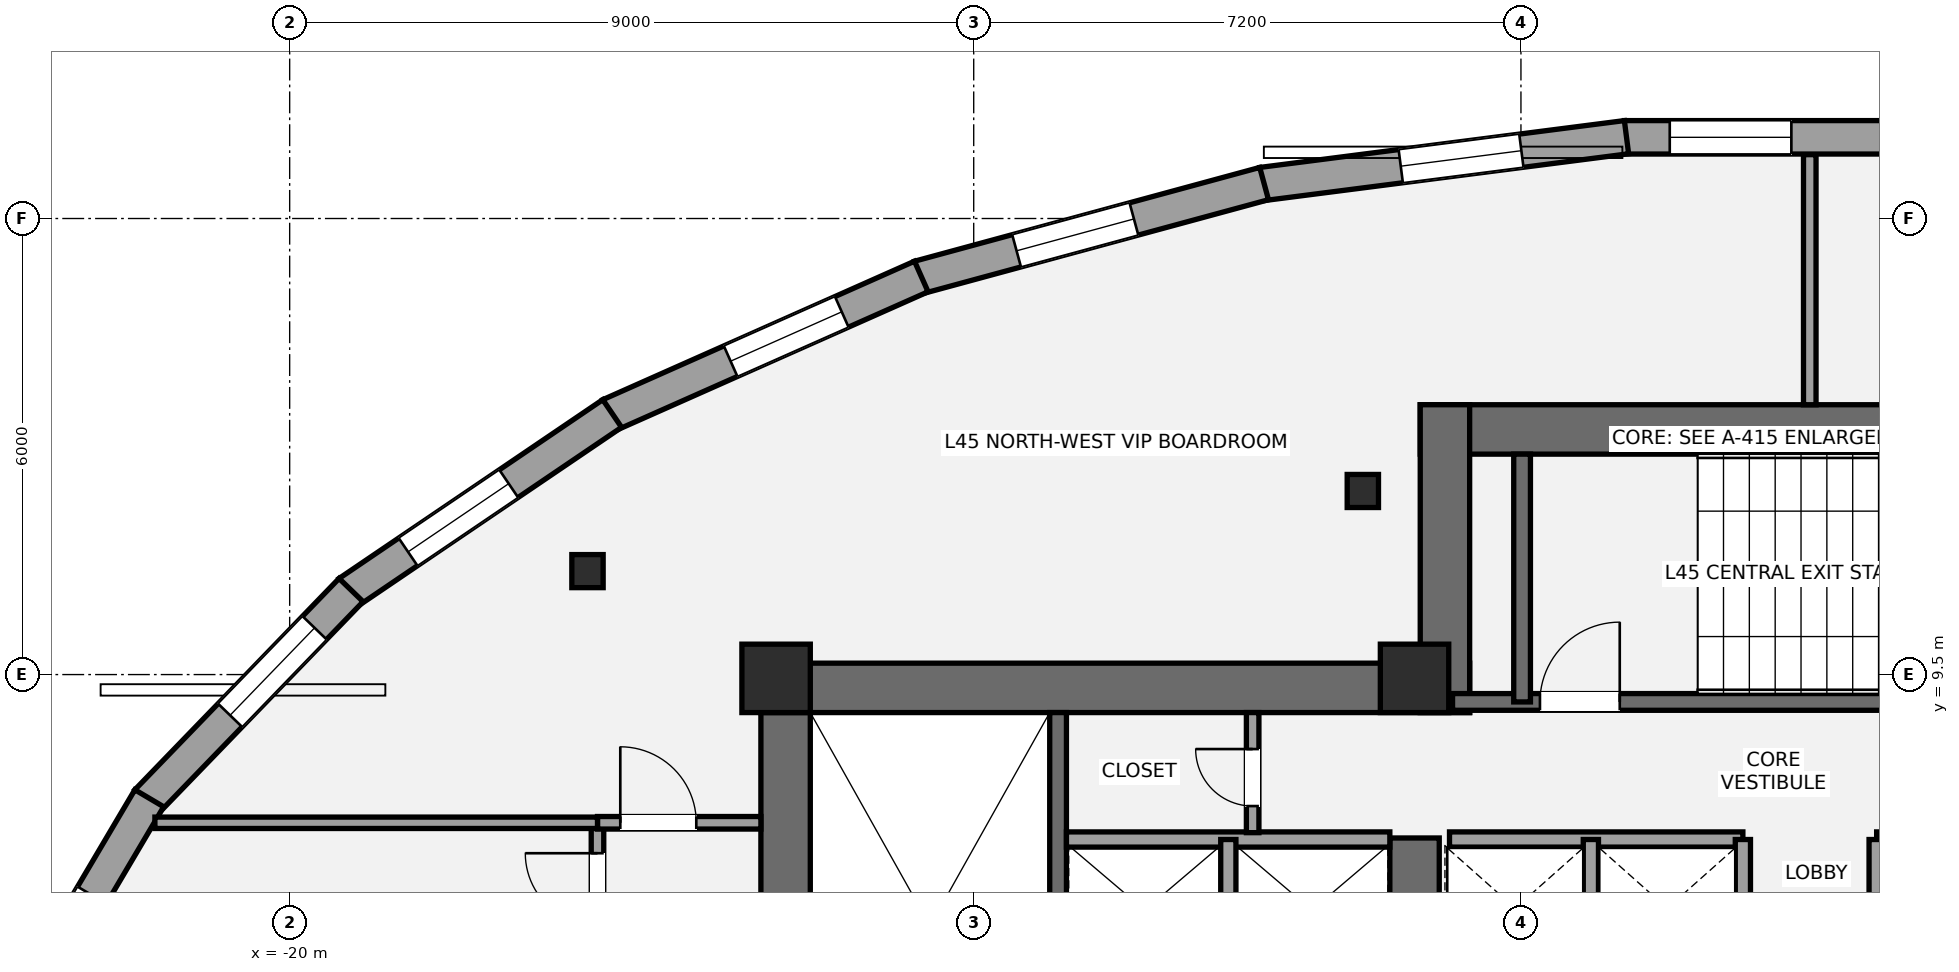
"""IFC4 building model, lengths in metres.
Left out: names, types, materials, properties, quantities, classifications, styles, units other than length and angle.
Written with IfcOpenShell. Run it as: python <this file> out.ifc"""

import sys

from ifc_helpers import new_model, si_unit, direction, frame, frame_2d, origin, origin_2d, place, context, subcontext, project, spatial, rectangle, i_section, extrude, element, fill, save


model = new_model("IFC4")
c1 = context("Model", 3, precision=1e-05, world=origin(), true_north=direction((0.0, 1.0)))
c2 = subcontext(c1, "Body", "Model", "MODEL_VIEW")
j1 = project(units=[si_unit("LENGTHUNIT", "METRE"), si_unit("PLANEANGLEUNIT", "RADIAN")], contexts=[c1])
p1 = place(None, origin())
s1 = spatial("IfcSite", under=j1, at=p1, CompositionType="ELEMENT")
p2 = place(p1, origin())
s2 = spatial("IfcBuilding", under=s1, at=p2, CompositionType="ELEMENT")
p3 = place(p2, frame((0.0, 0.0, 166.2)))
s3 = spatial("IfcBuildingStorey", under=s2, at=p3, CompositionType="ELEMENT", Elevation=166.2)
p4 = place(p3, frame((-13.475, 1.2, 0.0), z_axis=(0.0, 0.0, 1.0), x_axis=(0.0, 1.0, 0.0)))
e1 = element("IfcWall", 1, at=p4, inside=s3, PredefinedType="SHEAR", context=c2, shape_type="SweptSolid", body=[
    extrude(rectangle(XDim=8.45, YDim=0.65, at=frame_2d((4.225, 0.0))), origin(), (0.0, 0.0, 1.0), 3.2),
])
p5 = place(p3, frame((-13.8, 9.325, 0.0), z_axis=(0.0, 0.0, 1.0), x_axis=(1.0, 0.0, 0.0)))
e2 = element("IfcWall", 2, at=p5, inside=s3, PredefinedType="SHEAR", context=c2, shape_type="SweptSolid", body=[
    extrude(rectangle(XDim=9.325, YDim=0.65, at=frame_2d((4.663, 0.0))), origin(), (0.0, 0.0, 1.0), 3.2),
])
p6 = place(p3, frame((-5.2, 5.35, 0.0), z_axis=(0.0, 0.0, 1.0), x_axis=(0.0, 1.0, 0.0)))
e3 = element("IfcWall", 3, at=p6, inside=s3, PredefinedType="SHEAR", context=c2, shape_type="SweptSolid", body=[
    extrude(rectangle(XDim=2.0, YDim=0.65, at=frame_2d((1.0, 0.0))), origin(), (0.0, 0.0, 1.0), 3.2),
])
p7 = place(p3, frame((-9.89, 1.85, 0.0), z_axis=(0.0, 0.0, 1.0), x_axis=(0.0, 1.0, 0.0)))
e4 = element("IfcWall", 4, at=p7, inside=s3, PredefinedType="SHEAR", context=c2, shape_type="SweptSolid", body=[
    extrude(rectangle(XDim=7.15, YDim=0.22, at=frame_2d((3.575, 0.0))), origin(), (0.0, 0.0, 1.0), 3.2),
])
p8 = place(p3, frame((-5.125, 12.725, 0.0), z_axis=(0.0, 0.0, 1.0), x_axis=(1.0, 0.0, 0.0)))
e5 = element("IfcWall", 5, at=p8, inside=s3, PredefinedType="SHEAR", context=c2, shape_type="SweptSolid", body=[
    extrude(rectangle(XDim=10.25, YDim=0.65, at=frame_2d((5.125, 0.0))), origin(), (0.0, 0.0, 1.0), 3.2),
])
p9 = place(p3, frame((-4.8, 9.0, 0.0), z_axis=(0.0, 0.0, 1.0), x_axis=(0.0, 1.0, 0.0)))
e6 = element("IfcWall", 6, at=p9, inside=s3, PredefinedType="SHEAR", context=c2, shape_type="SweptSolid", body=[
    extrude(rectangle(XDim=4.05, YDim=0.65, at=frame_2d((2.025, 0.0))), origin(), (0.0, 0.0, 1.0), 3.2),
])
p10 = place(p3, frame((-4.7, 9.14, 0.0), z_axis=(0.0, 0.0, 1.0), x_axis=(1.0, 0.0, 0.0)))
e7 = element("IfcWall", 7, at=p10, inside=s3, PredefinedType="SHEAR", context=c2, shape_type="SweptSolid", body=[
    extrude(rectangle(XDim=9.3, YDim=0.22, at=frame_2d((4.65, 0.0))), origin(), (0.0, 0.0, 1.0), 3.2),
])
p11 = place(p10, frame((1.15, 0.0, 0.0)))
e8 = element("IfcOpeningElement", 8, at=p11, cuts=e7, PredefinedType="OPENING", context=c2, shape_type="SweptSolid", body=[
    extrude(rectangle(XDim=1.05, YDim=2.15, at=frame_2d((0.525, 1.075))), frame((0.0, 0.12, 0.0), z_axis=(0.0, -1.0, 0.0), x_axis=(1.0, 0.0, 0.0)), (0.0, 0.0, 1.0), 0.24),
])
p12 = place(p3, frame((-3.785, 9.14, 0.0), z_axis=(0.0, 0.0, 1.0), x_axis=(0.0, 1.0, 0.0)))
e9 = element("IfcWall", 9, at=p12, inside=s3, PredefinedType="SHEAR", context=c2, shape_type="SweptSolid", body=[
    extrude(rectangle(XDim=3.26, YDim=0.22, at=frame_2d((1.63, 0.0))), origin(), (0.0, 0.0, 1.0), 3.2),
])
for number, where, z_axis, x_axis in (
    (10, (-13.6, 9.45, 0.0), (0.0, 0.0, 1.0), (1.0, 0.0, 0.0)),
    (11, (-5.2, 9.45, 0.0), (0.0, 0.0, 1.0), (1.0, 0.0, 0.0)),
):
    element("IfcColumn", number, at=place(p3, frame(where, z_axis=z_axis, x_axis=x_axis)), inside=s3, PredefinedType="COLUMN", context=c2, shape_type="SweptSolid", body=[
        extrude(rectangle(XDim=0.9, YDim=0.9, at=origin_2d()), origin(), (0.0, 0.0, 1.0), 3.2),
    ])
for number, where, z_axis, x_axis in (
    (12, (-5.88, 11.915, 0.0), (0.0, 0.0, 1.0), (1.0, 0.0, 0.0)),
    (13, (-16.082, 10.861, 0.0), (0.0, 0.0, 1.0), (1.0, 0.0, 0.0)),
):
    element("IfcColumn", number, at=place(p3, frame(where, z_axis=z_axis, x_axis=x_axis)), inside=s3, PredefinedType="COLUMN", context=c2, shape_type="SweptSolid", body=[
        extrude(i_section(OverallWidth=0.412, OverallDepth=0.435, WebThickness=0.036, FlangeThickness=0.057, at=origin_2d()), origin(), (0.0, 0.0, 1.0), 3.2),
    ])
p13 = place(p3, frame((-2.439, 16.568, 0.0), z_axis=(0.0, 0.0, 1.0), x_axis=(1.0, 0.0, 0.0)))
e14 = element("IfcWall", 14, at=p13, inside=s3, PredefinedType="STANDARD", context=c2, shape_type="SweptSolid", body=[
    extrude(rectangle(XDim=4.878, YDim=0.44, at=frame_2d((2.439, 0.0))), origin(), (0.0, 0.0, 1.0), 2.315),
])
p14 = place(p13, frame((0.597, 0.0, 0.58)))
e15 = element("IfcOpeningElement", 15, at=p14, cuts=e14, PredefinedType="OPENING", context=c2, shape_type="SweptSolid", body=[
    extrude(rectangle(XDim=1.6, YDim=1.55, at=frame_2d((0.8, 0.775))), frame((0.0, 0.23, 0.0), z_axis=(0.0, -1.0, 0.0), x_axis=(1.0, 0.0, 0.0)), (0.0, 0.0, 1.0), 0.46),
])
p15 = place(p3, frame((-7.209, 15.954, 0.0), z_axis=(0.0, 0.0, 1.0), x_axis=(0.991852910824, 0.127388395426, 0.0)))
e16 = element("IfcWall", 16, at=p15, inside=s3, PredefinedType="STANDARD", context=c2, shape_type="SweptSolid", body=[
    extrude(rectangle(XDim=4.837, YDim=0.44, at=frame_2d((2.418, 0.0))), origin(), (0.0, 0.0, 1.0), 2.315),
])
p16 = place(p15, frame((1.843, 0.0, 0.58)))
e17 = element("IfcOpeningElement", 17, at=p16, cuts=e16, PredefinedType="OPENING", context=c2, shape_type="SweptSolid", body=[
    extrude(rectangle(XDim=1.6, YDim=1.55, at=frame_2d((0.8, 0.775))), frame((0.0, 0.23, 0.0), z_axis=(0.0, -1.0, 0.0), x_axis=(1.0, 0.0, 0.0)), (0.0, 0.0, 1.0), 0.46),
])
p17 = place(p3, frame((-11.721, 14.726, 0.0), z_axis=(0.0, 0.0, 1.0), x_axis=(0.965037424263, 0.262112132058, 0.0)))
e18 = element("IfcWall", 18, at=p17, inside=s3, PredefinedType="STANDARD", context=c2, shape_type="SweptSolid", body=[
    extrude(rectangle(XDim=4.707, YDim=0.44, at=frame_2d((2.353, 0.0))), origin(), (0.0, 0.0, 1.0), 2.315),
])
p18 = place(p17, frame((1.332, 0.0, 0.58)))
e19 = element("IfcOpeningElement", 19, at=p18, cuts=e18, PredefinedType="OPENING", context=c2, shape_type="SweptSolid", body=[
    extrude(rectangle(XDim=1.6, YDim=1.55, at=frame_2d((0.8, 0.775))), frame((0.0, 0.23, 0.0), z_axis=(0.0, -1.0, 0.0), x_axis=(1.0, 0.0, 0.0)), (0.0, 0.0, 1.0), 0.46),
])
p19 = place(p3, frame((-15.791, 12.916, 0.0), z_axis=(0.0, 0.0, 1.0), x_axis=(0.913907994914, 0.405921392431, 0.0)))
e20 = element("IfcWall", 20, at=p19, inside=s3, PredefinedType="STANDARD", context=c2, shape_type="SweptSolid", body=[
    extrude(rectangle(XDim=4.487, YDim=0.44, at=frame_2d((2.244, 0.0))), origin(), (0.0, 0.0, 1.0), 2.315),
])
p20 = place(p19, frame((1.742, 0.0, 0.58)))
e21 = element("IfcOpeningElement", 21, at=p20, cuts=e20, PredefinedType="OPENING", context=c2, shape_type="SweptSolid", body=[
    extrude(rectangle(XDim=1.6, YDim=1.55, at=frame_2d((0.8, 0.775))), frame((0.0, 0.23, 0.0), z_axis=(0.0, -1.0, 0.0), x_axis=(1.0, 0.0, 0.0)), (0.0, 0.0, 1.0), 0.46),
])
p21 = place(p3, frame((-19.227, 10.583, 0.0), z_axis=(0.0, 0.0, 1.0), x_axis=(0.827760762475, 0.561081206338, 0.0)))
e22 = element("IfcWall", 22, at=p21, inside=s3, PredefinedType="STANDARD", context=c2, shape_type="SweptSolid", body=[
    extrude(rectangle(XDim=4.192, YDim=0.44, at=frame_2d((2.096, 0.0))), origin(), (0.0, 0.0, 1.0), 2.315),
])
p22 = place(p21, frame((0.947, 0.0, 0.58)))
e23 = element("IfcOpeningElement", 23, at=p22, cuts=e22, PredefinedType="OPENING", context=c2, shape_type="SweptSolid", body=[
    extrude(rectangle(XDim=1.6, YDim=1.55, at=frame_2d((0.8, 0.775))), frame((0.0, 0.23, 0.0), z_axis=(0.0, -1.0, 0.0), x_axis=(1.0, 0.0, 0.0)), (0.0, 0.0, 1.0), 0.46),
])
p23 = place(p3, frame((-21.879, 7.832, 0.0), z_axis=(0.0, 0.0, 1.0), x_axis=(0.694975307772, 0.719033602544, 0.0)))
e24 = element("IfcWall", 24, at=p23, inside=s3, PredefinedType="STANDARD", context=c2, shape_type="SweptSolid", body=[
    extrude(rectangle(XDim=3.866, YDim=0.44, at=frame_2d((1.933, 0.0))), origin(), (0.0, 0.0, 1.0), 2.315),
])
p24 = place(p23, frame((1.575, 0.0, 0.58)))
e25 = element("IfcOpeningElement", 25, at=p24, cuts=e24, PredefinedType="OPENING", context=c2, shape_type="SweptSolid", body=[
    extrude(rectangle(XDim=1.6, YDim=1.55, at=frame_2d((0.8, 0.775))), frame((0.0, 0.23, 0.0), z_axis=(0.0, -1.0, 0.0), x_axis=(1.0, 0.0, 0.0)), (0.0, 0.0, 1.0), 0.46),
])
p25 = place(p3, frame((-23.667, 4.794, 0.0), z_axis=(0.0, 0.0, 1.0), x_axis=(0.508883387051, 0.860835465338, 0.0)))
e26 = element("IfcWall", 26, at=p25, inside=s3, PredefinedType="STANDARD", context=c2, shape_type="SweptSolid", body=[
    extrude(rectangle(XDim=3.577, YDim=0.44, at=frame_2d((1.788, 0.0))), origin(), (0.0, 0.0, 1.0), 2.315),
])
p26 = place(p25, frame((0.496, 0.0, 0.58)))
e27 = element("IfcOpeningElement", 27, at=p26, cuts=e26, PredefinedType="OPENING", context=c2, shape_type="SweptSolid", body=[
    extrude(rectangle(XDim=1.6, YDim=1.55, at=frame_2d((0.8, 0.775))), frame((0.0, 0.23, 0.0), z_axis=(0.0, -1.0, 0.0), x_axis=(1.0, 0.0, 0.0)), (0.0, 0.0, 1.0), 0.46),
])
p27 = place(p3, frame((-9.78, 7.33, 0.0), z_axis=(0.0, 0.0, 1.0), x_axis=(1.0, 0.0, 0.0)))
e28 = element("IfcWall", 28, at=p27, inside=s3, PredefinedType="SOLIDWALL", context=c2, shape_type="SweptSolid", body=[
    extrude(rectangle(XDim=4.255, YDim=0.2, at=frame_2d((2.127, 0.0))), origin(), (0.0, 0.0, 1.0), 3.02),
])
p28 = place(p3, frame((-7.65, 5.47, 0.0), z_axis=(0.0, 0.0, 1.0), x_axis=(0.0, 1.0, 0.0)))
e29 = element("IfcWall", 29, at=p28, inside=s3, PredefinedType="SOLIDWALL", context=c2, shape_type="SweptSolid", body=[
    extrude(rectangle(XDim=1.86, YDim=0.2, at=frame_2d((0.93, 0.0))), origin(), (0.0, 0.0, 1.0), 3.02),
])
for number, where, z_axis, x_axis in (
    (30, (-4.74, 7.33, 0.0), (0.0, 0.0, 1.0), (1.0, 0.0, 0.0)),
    (31, (0.88, 7.33, 0.0), (0.0, 0.0, 1.0), (1.0, 0.0, 0.0)),
):
    element("IfcWall", number, at=place(p3, frame(where, z_axis=z_axis, x_axis=x_axis)), inside=s3, PredefinedType="SOLIDWALL", context=c2, shape_type="SweptSolid", body=[
        extrude(rectangle(XDim=3.86, YDim=0.2, at=frame_2d((1.93, 0.0))), origin(), (0.0, 0.0, 1.0), 3.02),
    ])
for number, where, z_axis, x_axis in (
    (32, (-2.88, 5.52, 0.0), (0.0, 0.0, 1.0), (0.0, 1.0, 0.0)),
    (33, (-0.88, 5.52, 0.0), (0.0, 0.0, 1.0), (0.0, 1.0, 0.0)),
    (34, (0.88, 5.52, 0.0), (0.0, 0.0, 1.0), (0.0, 1.0, 0.0)),
):
    element("IfcWall", number, at=place(p3, frame(where, z_axis=z_axis, x_axis=x_axis)), inside=s3, PredefinedType="SOLIDWALL", context=c2, shape_type="SweptSolid", body=[
        extrude(rectangle(XDim=1.81, YDim=0.2, at=frame_2d((0.905, 0.0))), origin(), (0.0, 0.0, 1.0), 3.02),
    ])
p29 = place(p3, frame((-7.33, 7.42, 0.0), z_axis=(0.0, 0.0, 1.0), x_axis=(0.0, 1.0, 0.0)))
e35 = element("IfcWall", 35, at=p29, inside=s3, PredefinedType="PARTITIONING", context=c2, shape_type="SweptSolid", body=[
    extrude(rectangle(XDim=1.58, YDim=0.165, at=frame_2d((0.79, 0.0))), origin(), (0.0, 0.0, 1.0), 3.02),
])
p30 = place(p29, frame((0.35, 0.0, 0.0)))
e36 = element("IfcOpeningElement", 36, at=p30, cuts=e35, PredefinedType="OPENING", context=c2, shape_type="SweptSolid", body=[
    extrude(rectangle(XDim=0.75, YDim=2.1, at=frame_2d((0.375, 1.05))), frame((0.0, 0.093, 0.0), z_axis=(0.0, -1.0, 0.0), x_axis=(1.0, 0.0, 0.0)), (0.0, 0.0, 1.0), 0.185),
])
p31 = place(p3, frame((-15.95, -12.528, 0.0), z_axis=(0.0, 0.0, 1.0), x_axis=(0.0, 1.0, 0.0)))
e37 = element("IfcWall", 37, at=p31, inside=s3, PredefinedType="PARTITIONING", context=c2, shape_type="SweptSolid", body=[
    extrude(rectangle(XDim=20.078, YDim=0.165, at=frame_2d((10.039, 0.0))), origin(), (0.0, 0.0, 1.0), 2.473),
])
p32 = place(p31, frame((5.528, 0.0, 0.0)))
e38 = element("IfcOpeningElement", 38, at=p32, cuts=e37, PredefinedType="OPENING", context=c2, shape_type="SweptSolid", body=[
    extrude(rectangle(XDim=0.85, YDim=2.1, at=frame_2d((0.425, 1.05))), frame((0.0, 0.093, 0.0), z_axis=(0.0, -1.0, 0.0), x_axis=(1.0, 0.0, 0.0)), (0.0, 0.0, 1.0), 0.185),
])
p33 = place(p31, frame((12.978, 0.0, 0.0)))
e39 = element("IfcOpeningElement", 39, at=p33, cuts=e37, PredefinedType="OPENING", context=c2, shape_type="SweptSolid", body=[
    extrude(rectangle(XDim=0.95, YDim=2.15, at=frame_2d((0.475, 1.075))), frame((0.0, 0.093, 0.0), z_axis=(0.0, -1.0, 0.0), x_axis=(1.0, 0.0, 0.0)), (0.0, 0.0, 1.0), 0.185),
])
p34 = place(p31, frame((18.728, 0.0, 0.0)))
e40 = element("IfcOpeningElement", 40, at=p34, cuts=e37, PredefinedType="OPENING", context=c2, shape_type="SweptSolid", body=[
    extrude(rectangle(XDim=0.95, YDim=2.15, at=frame_2d((0.475, 1.075))), frame((0.0, 0.093, 0.0), z_axis=(0.0, -1.0, 0.0), x_axis=(1.0, 0.0, 0.0)), (0.0, 0.0, 1.0), 0.185),
])
p35 = place(p3, frame((-15.95, 7.55, 0.0), z_axis=(0.0, 0.0, 1.0), x_axis=(1.0, 0.0, 0.0)))
e41 = element("IfcWall", 41, at=p35, inside=s3, PredefinedType="PARTITIONING", context=c2, shape_type="SweptSolid", body=[
    extrude(rectangle(XDim=2.15, YDim=0.165, at=frame_2d((1.075, 0.0))), origin(), (0.0, 0.0, 1.0), 3.02),
])
p36 = place(p35, frame((0.3, 0.0, 0.0)))
e42 = element("IfcOpeningElement", 42, at=p36, cuts=e41, PredefinedType="OPENING", context=c2, shape_type="SweptSolid", body=[
    extrude(rectangle(XDim=1.0, YDim=2.15, at=frame_2d((0.5, 1.075))), frame((0.0, 0.093, 0.0), z_axis=(0.0, -1.0, 0.0), x_axis=(1.0, 0.0, 0.0)), (0.0, 0.0, 1.0), 0.185),
])
p37 = place(p3, frame((-21.773, 7.55, 0.0), z_axis=(0.0, 0.0, 1.0), x_axis=(1.0, 0.0, 0.0)))
e43 = element("IfcWall", 43, at=p37, inside=s3, PredefinedType="PLUMBINGWALL", context=c2, shape_type="SweptSolid", body=[
    extrude(rectangle(XDim=5.823, YDim=0.15, at=frame_2d((2.912, 0.0))), origin(), (0.0, 0.0, 1.0), 2.473),
])
p38 = place(p3, frame((0.0, 13.05, 0.0), z_axis=(0.0, 0.0, 1.0), x_axis=(0.0, 1.0, 0.0)))
e44 = element("IfcWall", 44, at=p38, inside=s3, PredefinedType="PARTITIONING", context=c2, shape_type="SweptSolid", body=[
    extrude(rectangle(XDim=3.29, YDim=0.165, at=frame_2d((1.645, 0.0))), origin(), (0.0, 0.0, 1.0), 3.02),
])
p39 = place(p14, origin())
e45 = element("IfcWindow", 45, at=p39, inside=s3, PartitioningType="SINGLE_PANEL", PredefinedType="WINDOW", context=c2, shape_type="SweptSolid", body=[
    extrude(rectangle(XDim=1.6, YDim=1.55, at=frame_2d((0.8, 0.775))), frame((0.0, -0.01, 0.0), z_axis=(0.0, -1.0, 0.0), x_axis=(1.0, 0.0, 0.0)), (0.0, 0.0, 1.0), 0.06),
])
fill(e15, e45)
p40 = place(p16, origin())
e46 = element("IfcWindow", 46, at=p40, inside=s3, PartitioningType="SINGLE_PANEL", PredefinedType="WINDOW", context=c2, shape_type="SweptSolid", body=[
    extrude(rectangle(XDim=1.6, YDim=1.55, at=frame_2d((0.8, 0.775))), frame((0.0, -0.01, 0.0), z_axis=(0.0, -1.0, 0.0), x_axis=(1.0, 0.0, 0.0)), (0.0, 0.0, 1.0), 0.06),
])
fill(e17, e46)
p41 = place(p18, origin())
e47 = element("IfcWindow", 47, at=p41, inside=s3, PartitioningType="SINGLE_PANEL", PredefinedType="WINDOW", context=c2, shape_type="SweptSolid", body=[
    extrude(rectangle(XDim=1.6, YDim=1.55, at=frame_2d((0.8, 0.775))), frame((0.0, -0.01, 0.0), z_axis=(0.0, -1.0, 0.0), x_axis=(1.0, 0.0, 0.0)), (0.0, 0.0, 1.0), 0.06),
])
fill(e19, e47)
p42 = place(p20, origin())
e48 = element("IfcWindow", 48, at=p42, inside=s3, PartitioningType="SINGLE_PANEL", PredefinedType="WINDOW", context=c2, shape_type="SweptSolid", body=[
    extrude(rectangle(XDim=1.6, YDim=1.55, at=frame_2d((0.8, 0.775))), frame((0.0, -0.01, 0.0), z_axis=(0.0, -1.0, 0.0), x_axis=(1.0, 0.0, 0.0)), (0.0, 0.0, 1.0), 0.06),
])
fill(e21, e48)
p43 = place(p22, origin())
e49 = element("IfcWindow", 49, at=p43, inside=s3, PartitioningType="SINGLE_PANEL", PredefinedType="WINDOW", context=c2, shape_type="SweptSolid", body=[
    extrude(rectangle(XDim=1.6, YDim=1.55, at=frame_2d((0.8, 0.775))), frame((0.0, -0.01, 0.0), z_axis=(0.0, -1.0, 0.0), x_axis=(1.0, 0.0, 0.0)), (0.0, 0.0, 1.0), 0.06),
])
fill(e23, e49)
p44 = place(p24, origin())
e50 = element("IfcWindow", 50, at=p44, inside=s3, PartitioningType="SINGLE_PANEL", PredefinedType="WINDOW", context=c2, shape_type="SweptSolid", body=[
    extrude(rectangle(XDim=1.6, YDim=1.55, at=frame_2d((0.8, 0.775))), frame((0.0, -0.01, 0.0), z_axis=(0.0, -1.0, 0.0), x_axis=(1.0, 0.0, 0.0)), (0.0, 0.0, 1.0), 0.06),
])
fill(e25, e50)
p45 = place(p11, origin())
e51 = element("IfcDoor", 51, at=p45, inside=s3, OperationType="SINGLE_SWING_RIGHT", PredefinedType="DOOR", context=c2, shape_type="SweptSolid", body=[
    extrude(rectangle(XDim=1.05, YDim=2.15, at=frame_2d((0.525, 1.075))), frame((0.0, 0.025, 0.0), z_axis=(0.0, -1.0, 0.0), x_axis=(1.0, 0.0, 0.0)), (0.0, 0.0, 1.0), 0.05),
])
fill(e8, e51)
p46 = place(p30, origin())
e52 = element("IfcDoor", 52, at=p46, inside=s3, OperationType="SINGLE_SWING_RIGHT", PredefinedType="DOOR", context=c2, shape_type="SweptSolid", body=[
    extrude(rectangle(XDim=0.75, YDim=2.1, at=frame_2d((0.375, 1.05))), frame((0.0, 0.025, 0.0), z_axis=(0.0, -1.0, 0.0), x_axis=(1.0, 0.0, 0.0)), (0.0, 0.0, 1.0), 0.05),
])
fill(e36, e52)
p47 = place(p36, origin())
e53 = element("IfcDoor", 53, at=p47, inside=s3, OperationType="SINGLE_SWING_LEFT", PredefinedType="DOOR", context=c2, shape_type="SweptSolid", body=[
    extrude(rectangle(XDim=1.0, YDim=2.15, at=frame_2d((0.5, 1.075))), frame((0.0, 0.025, 0.0), z_axis=(0.0, -1.0, 0.0), x_axis=(1.0, 0.0, 0.0)), (0.0, 0.0, 1.0), 0.05),
])
fill(e42, e53)
p48 = place(p34, origin())
e54 = element("IfcDoor", 54, at=p48, inside=s3, OperationType="SINGLE_SWING_RIGHT", PredefinedType="DOOR", context=c2, shape_type="SweptSolid", body=[
    extrude(rectangle(XDim=0.95, YDim=2.15, at=frame_2d((0.475, 1.075))), frame((0.0, 0.025, 0.0), z_axis=(0.0, -1.0, 0.0), x_axis=(1.0, 0.0, 0.0)), (0.0, 0.0, 1.0), 0.05),
])
fill(e40, e54)
save(model, sys.argv[1])
